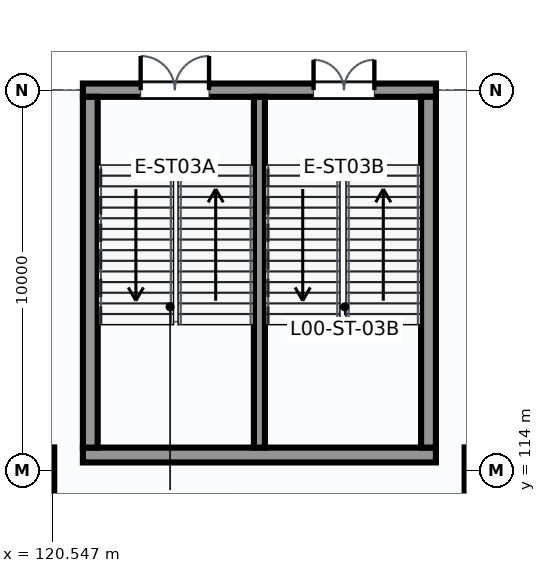
"""IFC4 building model, lengths in metres.
Left out: names, types, materials, properties, quantities, classifications, styles, units other than length and angle.
Written with IfcOpenShell. Run it as: python <this file> out.ifc"""

import sys

from ifc_helpers import new_model, si_unit, direction, frame, frame_2d, origin, origin_2d, place, context, subcontext, project, spatial, rectangle, extrude, element, fill, save


model = new_model("IFC4")
c1 = context("Model", 3, precision=1e-05, world=origin(), true_north=direction((0.0, 1.0)))
c2 = subcontext(c1, "Body", "Model", "MODEL_VIEW")
j1 = project(units=[si_unit("LENGTHUNIT", "METRE"), si_unit("PLANEANGLEUNIT", "RADIAN")], contexts=[c1])
p1 = place(None, origin())
s1 = spatial("IfcSite", under=j1, at=p1, CompositionType="ELEMENT")
p2 = place(p1, origin())
s2 = spatial("IfcBuilding", under=s1, at=p2, CompositionType="ELEMENT")
p3 = place(p2, origin())
s3 = spatial("IfcBuildingStorey", under=s2, at=p3, CompositionType="ELEMENT", Elevation=0.0)
for number, where, z_axis, x_axis in (
    (1, (120.0, 114.0, 0.0), (0.0, 0.0, 1.0), (1.0, 0.0, 0.0)),
    (2, (132.0, 114.0, 0.0), (0.0, 0.0, 1.0), (1.0, 0.0, 0.0)),
):
    element("IfcColumn", number, at=place(p3, frame(where, z_axis=z_axis, x_axis=x_axis)), inside=s3, PredefinedType="COLUMN", context=c2, shape_type="SweptSolid", body=[
        extrude(rectangle(XDim=1.2, YDim=1.2, at=origin_2d()), origin(), (0.0, 0.0, 1.0), 5.4),
    ])
p4 = place(p3, frame((121.355, 114.4, 0.0), z_axis=(0.0, 0.0, 1.0), x_axis=(1.0, 0.0, 0.0)))
e3 = element("IfcWall", 3, at=p4, inside=s3, PredefinedType="SHEAR", context=c2, shape_type="SweptSolid", body=[
    extrude(rectangle(XDim=9.29, YDim=0.39, at=frame_2d((4.645, 0.0))), origin(), (0.0, 0.0, 1.0), 5.4),
])
p5 = place(p3, frame((121.355, 124.0, 0.0), z_axis=(0.0, 0.0, 1.0), x_axis=(1.0, 0.0, 0.0)))
e4 = element("IfcWall", 4, at=p5, inside=s3, PredefinedType="SHEAR", context=c2, shape_type="SweptSolid", body=[
    extrude(rectangle(XDim=9.29, YDim=0.35, at=frame_2d((4.645, 0.0))), origin(), (0.0, 0.0, 1.0), 4.496),
])
p6 = place(p5, frame((1.52, 0.0, 0.0)))
e5 = element("IfcOpeningElement", 5, at=p6, cuts=e4, PredefinedType="OPENING", context=c2, shape_type="SweptSolid", body=[
    extrude(rectangle(XDim=1.8, YDim=2.2, at=frame_2d((0.9, 1.1))), frame((0.0, 0.185, 0.0), z_axis=(0.0, -1.0, 0.0), x_axis=(1.0, 0.0, 0.0)), (0.0, 0.0, 1.0), 0.37),
])
p7 = place(p5, frame((6.07, 0.0, 0.0)))
e6 = element("IfcOpeningElement", 6, at=p7, cuts=e4, PredefinedType="OPENING", context=c2, shape_type="SweptSolid", body=[
    extrude(rectangle(XDim=1.6, YDim=2.2, at=frame_2d((0.8, 1.1))), frame((0.0, 0.185, 0.0), z_axis=(0.0, -1.0, 0.0), x_axis=(1.0, 0.0, 0.0)), (0.0, 0.0, 1.0), 0.37),
])
for number, where, z_axis, x_axis in (
    (7, (121.55, 114.595, 0.0), (0.0, 0.0, 1.0), (0.0, 1.0, 0.0)),
    (8, (130.45, 114.595, 0.0), (0.0, 0.0, 1.0), (0.0, 1.0, 0.0)),
):
    element("IfcWall", number, at=place(p3, frame(where, z_axis=z_axis, x_axis=x_axis)), inside=s3, PredefinedType="SHEAR", context=c2, shape_type="SweptSolid", body=[
        extrude(rectangle(XDim=9.23, YDim=0.39, at=frame_2d((4.615, 0.0))), origin(), (0.0, 0.0, 1.0), 5.4),
    ])
p8 = place(p3, frame((126.0, 114.595, 0.0), z_axis=(0.0, 0.0, 1.0), x_axis=(0.0, 1.0, 0.0)))
e9 = element("IfcWall", 9, at=p8, inside=s3, PredefinedType="SHEAR", context=c2, shape_type="SweptSolid", body=[
    extrude(rectangle(XDim=9.23, YDim=0.29, at=frame_2d((4.615, 0.0))), origin(), (0.0, 0.0, 1.0), 5.4),
])
p9 = place(p6, origin())
e10 = element("IfcDoor", 10, at=p9, inside=s3, OperationType="DOUBLE_DOOR_SINGLE_SWING", PredefinedType="DOOR", context=c2, shape_type="SweptSolid", body=[
    extrude(rectangle(XDim=1.8, YDim=2.2, at=frame_2d((0.9, 1.1))), frame((0.0, 0.025, 0.0), z_axis=(0.0, -1.0, 0.0), x_axis=(1.0, 0.0, 0.0)), (0.0, 0.0, 1.0), 0.05),
])
fill(e5, e10)
p10 = place(p7, origin())
e11 = element("IfcDoor", 11, at=p10, inside=s3, OperationType="DOUBLE_DOOR_SINGLE_SWING", PredefinedType="DOOR", context=c2, shape_type="SweptSolid", body=[
    extrude(rectangle(XDim=1.6, YDim=2.2, at=frame_2d((0.8, 1.1))), frame((0.0, 0.025, 0.0), z_axis=(0.0, -1.0, 0.0), x_axis=(1.0, 0.0, 0.0)), (0.0, 0.0, 1.0), 0.05),
])
fill(e6, e11)
save(model, sys.argv[1])
